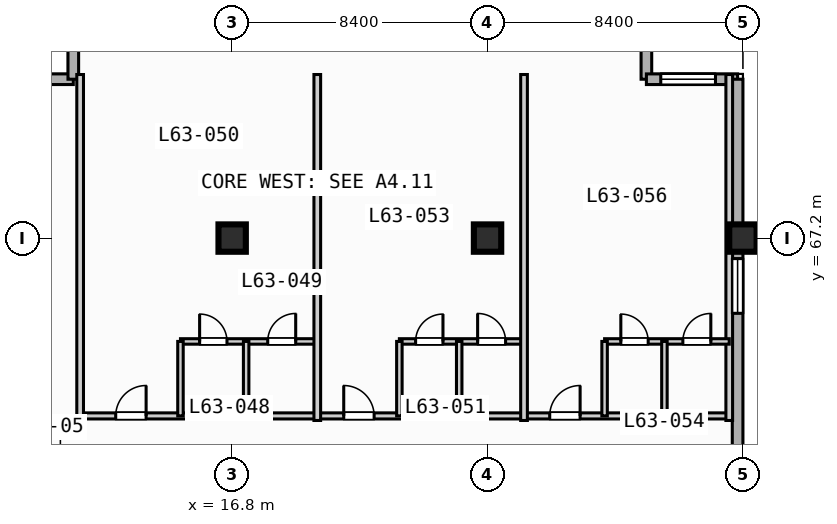
"""IFC4 building model, lengths in metres.
Left out: names, types, materials, properties, quantities, classifications, styles, units other than length and angle.
Written with IfcOpenShell. Run it as: python <this file> out.ifc"""

import sys

from ifc_helpers import new_model, si_unit, direction, frame, frame_2d, origin, origin_2d, place, context, subcontext, project, spatial, rectangle, extrude, element, fill, save


model = new_model("IFC4")
c1 = context("Model", 3, precision=1e-05, world=origin(), true_north=direction((0.0, 1.0)))
c2 = subcontext(c1, "Body", "Model", "MODEL_VIEW")
j1 = project(units=[si_unit("LENGTHUNIT", "METRE"), si_unit("PLANEANGLEUNIT", "RADIAN")], contexts=[c1])
p1 = place(None, origin())
s1 = spatial("IfcSite", under=j1, at=p1, CompositionType="ELEMENT")
p2 = place(p1, origin())
s2 = spatial("IfcBuilding", under=s1, at=p2, CompositionType="ELEMENT")
p3 = place(p2, frame((0.0, 0.0, 256.4)))
s3 = spatial("IfcBuildingStorey", under=s2, at=p3, CompositionType="ELEMENT", Elevation=256.4)
for number, where, z_axis, x_axis in (
    (1, (16.8, 67.2, 0.0), (0.0, 0.0, 1.0), (1.0, 0.0, 0.0)),
    (2, (25.2, 67.2, 0.0), (0.0, 0.0, 1.0), (1.0, 0.0, 0.0)),
    (3, (33.6, 67.2, 0.0), (0.0, 0.0, 1.0), (1.0, 0.0, 0.0)),
):
    element("IfcColumn", number, at=place(p3, frame(where, z_axis=z_axis, x_axis=x_axis)), inside=s3, PredefinedType="COLUMN", context=c2, shape_type="SweptSolid", body=[
        extrude(rectangle(XDim=0.9, YDim=0.9, at=origin_2d()), origin(), (0.0, 0.0, 1.0), 3.7),
    ])
for number, where, z_axis, x_axis in (
    (4, (8.575, 72.425, 0.0), (0.0, 0.0, 1.0), (1.0, 0.0, 0.0)),
    (5, (11.575, 72.425, 0.0), (0.0, 0.0, 1.0), (0.0, 1.0, 0.0)),
    (6, (30.425, 75.425, 0.0), (0.0, 0.0, 1.0), (0.0, -1.0, 0.0)),
):
    element("IfcWall", number, at=place(p3, frame(where, z_axis=z_axis, x_axis=x_axis)), inside=s3, PredefinedType="STANDARD", context=c2, shape_type="SweptSolid", body=[
        extrude(rectangle(XDim=3.0, YDim=0.35, at=frame_2d((1.5, 0.0))), origin(), (0.0, 0.0, 1.0), 3.47),
    ])
p4 = place(p3, frame((30.425, 72.425, 0.0), z_axis=(0.0, 0.0, 1.0), x_axis=(1.0, 0.0, 0.0)))
e7 = element("IfcWall", 7, at=p4, inside=s3, PredefinedType="STANDARD", context=c2, shape_type="SweptSolid", body=[
    extrude(rectangle(XDim=3.0, YDim=0.35, at=frame_2d((1.5, 0.0))), origin(), (0.0, 0.0, 1.0), 3.47),
])
p5 = place(p4, frame((0.472, 0.0, 0.85)))
e8 = element("IfcOpeningElement", 8, at=p5, cuts=e7, PredefinedType="OPENING", context=c2, shape_type="SweptSolid", body=[
    extrude(rectangle(XDim=1.8, YDim=1.8, at=frame_2d((0.9, 0.9))), frame((0.0, 0.185, 0.0), z_axis=(0.0, -1.0, 0.0), x_axis=(1.0, 0.0, 0.0)), (0.0, 0.0, 1.0), 0.37),
])
p6 = place(p3, frame((33.425, 72.425, 0.0), z_axis=(0.0, 0.0, 1.0), x_axis=(0.0, -1.0, 0.0)))
e9 = element("IfcWall", 9, at=p6, inside=s3, PredefinedType="STANDARD", context=c2, shape_type="SweptSolid", body=[
    extrude(rectangle(XDim=39.0, YDim=0.35, at=frame_2d((19.5, 0.0))), origin(), (0.0, 0.0, 1.0), 3.47),
])
p7 = place(p6, frame((5.9, 0.0, 0.85)))
e10 = element("IfcOpeningElement", 10, at=p7, cuts=e9, PredefinedType="OPENING", context=c2, shape_type="SweptSolid", body=[
    extrude(rectangle(XDim=1.8, YDim=1.8, at=frame_2d((0.9, 0.9))), frame((0.0, 0.185, 0.0), z_axis=(0.0, -1.0, 0.0), x_axis=(1.0, 0.0, 0.0)), (0.0, 0.0, 1.0), 0.37),
])
p8 = place(p3, frame((11.8, 61.35, 0.0), z_axis=(0.0, 0.0, 1.0), x_axis=(1.0, 0.0, 0.0)))
e11 = element("IfcWall", 11, at=p8, inside=s3, PredefinedType="PARTITIONING", context=c2, shape_type="SweptSolid", body=[
    extrude(rectangle(XDim=21.35, YDim=0.2, at=frame_2d((10.675, 0.0))), origin(), (0.0, 0.0, 1.0), 3.47),
])
p9 = place(p8, frame((1.17, 0.0, 0.0)))
e12 = element("IfcOpeningElement", 12, at=p9, cuts=e11, PredefinedType="OPENING", context=c2, shape_type="SweptSolid", body=[
    extrude(rectangle(XDim=1.0, YDim=2.15, at=frame_2d((0.5, 1.075))), frame((0.0, 0.11, 0.0), z_axis=(0.0, -1.0, 0.0), x_axis=(1.0, 0.0, 0.0)), (0.0, 0.0, 1.0), 0.22),
])
p10 = place(p8, frame((8.67, 0.0, 0.0)))
e13 = element("IfcOpeningElement", 13, at=p10, cuts=e11, PredefinedType="OPENING", context=c2, shape_type="SweptSolid", body=[
    extrude(rectangle(XDim=1.0, YDim=2.15, at=frame_2d((0.5, 1.075))), frame((0.0, 0.11, 0.0), z_axis=(0.0, -1.0, 0.0), x_axis=(1.0, 0.0, 0.0)), (0.0, 0.0, 1.0), 0.22),
])
p11 = place(p8, frame((15.445, 0.0, 0.0)))
e14 = element("IfcOpeningElement", 14, at=p11, cuts=e11, PredefinedType="OPENING", context=c2, shape_type="SweptSolid", body=[
    extrude(rectangle(XDim=1.0, YDim=2.15, at=frame_2d((0.5, 1.075))), frame((0.0, 0.11, 0.0), z_axis=(0.0, -1.0, 0.0), x_axis=(1.0, 0.0, 0.0)), (0.0, 0.0, 1.0), 0.22),
])
p12 = place(p3, frame((11.8, 61.2, 0.0), z_axis=(0.0, 0.0, 1.0), x_axis=(0.0, 1.0, 0.0)))
e15 = element("IfcWall", 15, at=p12, inside=s3, PredefinedType="PARTITIONING", context=c2, shape_type="SweptSolid", body=[
    extrude(rectangle(XDim=11.38, YDim=0.22, at=frame_2d((5.69, 0.0))), origin(), (0.0, 0.0, 1.0), 3.47),
])
p13 = place(p3, frame((15.1, 63.8, 0.0), z_axis=(0.0, 0.0, 1.0), x_axis=(1.0, 0.0, 0.0)))
e16 = element("IfcWall", 16, at=p13, inside=s3, PredefinedType="PLUMBINGWALL", context=c2, shape_type="SweptSolid", body=[
    extrude(rectangle(XDim=4.5, YDim=0.18, at=frame_2d((2.25, 0.0))), origin(), (0.0, 0.0, 1.0), 3.47),
])
p14 = place(p13, frame((0.63, 0.0, 0.0)))
e17 = element("IfcOpeningElement", 17, at=p14, cuts=e16, PredefinedType="OPENING", context=c2, shape_type="SweptSolid", body=[
    extrude(rectangle(XDim=0.9, YDim=2.1, at=frame_2d((0.45, 1.05))), frame((0.0, 0.1, 0.0), z_axis=(0.0, -1.0, 0.0), x_axis=(1.0, 0.0, 0.0)), (0.0, 0.0, 1.0), 0.2),
])
p15 = place(p13, frame((2.87, 0.0, 0.0)))
e18 = element("IfcOpeningElement", 18, at=p15, cuts=e16, PredefinedType="OPENING", context=c2, shape_type="SweptSolid", body=[
    extrude(rectangle(XDim=0.92, YDim=2.1, at=frame_2d((0.46, 1.05))), frame((0.0, 0.1, 0.0), z_axis=(0.0, -1.0, 0.0), x_axis=(1.0, 0.0, 0.0)), (0.0, 0.0, 1.0), 0.2),
])
for number, where, z_axis, x_axis in (
    (19, (15.1, 61.35, 0.0), (0.0, 0.0, 1.0), (0.0, 1.0, 0.0)),
    (20, (17.26, 61.35, 0.0), (0.0, 0.0, 1.0), (0.0, 1.0, 0.0)),
):
    element("IfcWall", number, at=place(p3, frame(where, z_axis=z_axis, x_axis=x_axis)), inside=s3, PredefinedType="PLUMBINGWALL", context=c2, shape_type="SweptSolid", body=[
        extrude(rectangle(XDim=2.45, YDim=0.18, at=frame_2d((1.225, 0.0))), origin(), (0.0, 0.0, 1.0), 3.47),
    ])
p16 = place(p3, frame((19.6, 61.2, 0.0), z_axis=(0.0, 0.0, 1.0), x_axis=(0.0, 1.0, 0.0)))
e21 = element("IfcWall", 21, at=p16, inside=s3, PredefinedType="PARTITIONING", context=c2, shape_type="SweptSolid", body=[
    extrude(rectangle(XDim=11.38, YDim=0.22, at=frame_2d((5.69, 0.0))), origin(), (0.0, 0.0, 1.0), 3.47),
])
p17 = place(p3, frame((22.3, 63.8, 0.0), z_axis=(0.0, 0.0, 1.0), x_axis=(1.0, 0.0, 0.0)))
e22 = element("IfcWall", 22, at=p17, inside=s3, PredefinedType="PLUMBINGWALL", context=c2, shape_type="SweptSolid", body=[
    extrude(rectangle(XDim=4.1, YDim=0.18, at=frame_2d((2.05, 0.0))), origin(), (0.0, 0.0, 1.0), 3.47),
])
p18 = place(p17, frame((0.534, 0.0, 0.0)))
e23 = element("IfcOpeningElement", 23, at=p18, cuts=e22, PredefinedType="OPENING", context=c2, shape_type="SweptSolid", body=[
    extrude(rectangle(XDim=0.9, YDim=2.1, at=frame_2d((0.45, 1.05))), frame((0.0, 0.1, 0.0), z_axis=(0.0, -1.0, 0.0), x_axis=(1.0, 0.0, 0.0)), (0.0, 0.0, 1.0), 0.2),
])
p19 = place(p17, frame((2.574, 0.0, 0.0)))
e24 = element("IfcOpeningElement", 24, at=p19, cuts=e22, PredefinedType="OPENING", context=c2, shape_type="SweptSolid", body=[
    extrude(rectangle(XDim=0.92, YDim=2.1, at=frame_2d((0.46, 1.05))), frame((0.0, 0.1, 0.0), z_axis=(0.0, -1.0, 0.0), x_axis=(1.0, 0.0, 0.0)), (0.0, 0.0, 1.0), 0.2),
])
for number, where, z_axis, x_axis in (
    (25, (22.3, 61.35, 0.0), (0.0, 0.0, 1.0), (0.0, 1.0, 0.0)),
    (26, (24.268, 61.35, 0.0), (0.0, 0.0, 1.0), (0.0, 1.0, 0.0)),
):
    element("IfcWall", number, at=place(p3, frame(where, z_axis=z_axis, x_axis=x_axis)), inside=s3, PredefinedType="PLUMBINGWALL", context=c2, shape_type="SweptSolid", body=[
        extrude(rectangle(XDim=2.45, YDim=0.18, at=frame_2d((1.225, 0.0))), origin(), (0.0, 0.0, 1.0), 3.47),
    ])
for number, where, z_axis, x_axis in (
    (27, (26.4, 61.2, 0.0), (0.0, 0.0, 1.0), (0.0, 1.0, 0.0)),
    (28, (33.15, 61.2, 0.0), (0.0, 0.0, 1.0), (0.0, 1.0, 0.0)),
):
    element("IfcWall", number, at=place(p3, frame(where, z_axis=z_axis, x_axis=x_axis)), inside=s3, PredefinedType="PARTITIONING", context=c2, shape_type="SweptSolid", body=[
        extrude(rectangle(XDim=11.38, YDim=0.22, at=frame_2d((5.69, 0.0))), origin(), (0.0, 0.0, 1.0), 3.47),
    ])
p20 = place(p3, frame((29.05, 63.8, 0.0), z_axis=(0.0, 0.0, 1.0), x_axis=(1.0, 0.0, 0.0)))
e29 = element("IfcWall", 29, at=p20, inside=s3, PredefinedType="PLUMBINGWALL", context=c2, shape_type="SweptSolid", body=[
    extrude(rectangle(XDim=4.1, YDim=0.18, at=frame_2d((2.05, 0.0))), origin(), (0.0, 0.0, 1.0), 3.47),
])
p21 = place(p20, frame((0.534, 0.0, 0.0)))
e30 = element("IfcOpeningElement", 30, at=p21, cuts=e29, PredefinedType="OPENING", context=c2, shape_type="SweptSolid", body=[
    extrude(rectangle(XDim=0.9, YDim=2.1, at=frame_2d((0.45, 1.05))), frame((0.0, 0.1, 0.0), z_axis=(0.0, -1.0, 0.0), x_axis=(1.0, 0.0, 0.0)), (0.0, 0.0, 1.0), 0.2),
])
p22 = place(p20, frame((2.574, 0.0, 0.0)))
e31 = element("IfcOpeningElement", 31, at=p22, cuts=e29, PredefinedType="OPENING", context=c2, shape_type="SweptSolid", body=[
    extrude(rectangle(XDim=0.92, YDim=2.1, at=frame_2d((0.46, 1.05))), frame((0.0, 0.1, 0.0), z_axis=(0.0, -1.0, 0.0), x_axis=(1.0, 0.0, 0.0)), (0.0, 0.0, 1.0), 0.2),
])
for number, where, z_axis, x_axis in (
    (32, (29.05, 61.35, 0.0), (0.0, 0.0, 1.0), (0.0, 1.0, 0.0)),
    (33, (31.018, 61.35, 0.0), (0.0, 0.0, 1.0), (0.0, 1.0, 0.0)),
):
    element("IfcWall", number, at=place(p3, frame(where, z_axis=z_axis, x_axis=x_axis)), inside=s3, PredefinedType="PLUMBINGWALL", context=c2, shape_type="SweptSolid", body=[
        extrude(rectangle(XDim=2.45, YDim=0.18, at=frame_2d((1.225, 0.0))), origin(), (0.0, 0.0, 1.0), 3.47),
    ])
p23 = place(p5, origin())
e34 = element("IfcWindow", 34, at=p23, inside=s3, PartitioningType="SINGLE_PANEL", PredefinedType="WINDOW", context=c2, shape_type="SweptSolid", body=[
    extrude(rectangle(XDim=1.8, YDim=1.8, at=frame_2d((0.9, 0.9))), frame((0.0, 0.03, 0.0), z_axis=(0.0, -1.0, 0.0), x_axis=(1.0, 0.0, 0.0)), (0.0, 0.0, 1.0), 0.06),
])
fill(e8, e34)
p24 = place(p7, origin())
e35 = element("IfcWindow", 35, at=p24, inside=s3, PartitioningType="SINGLE_PANEL", PredefinedType="WINDOW", context=c2, shape_type="SweptSolid", body=[
    extrude(rectangle(XDim=1.8, YDim=1.8, at=frame_2d((0.9, 0.9))), frame((0.0, 0.03, 0.0), z_axis=(0.0, -1.0, 0.0), x_axis=(1.0, 0.0, 0.0)), (0.0, 0.0, 1.0), 0.06),
])
fill(e10, e35)
p25 = place(p9, origin())
e36 = element("IfcDoor", 36, at=p25, inside=s3, OperationType="SINGLE_SWING_RIGHT", PredefinedType="DOOR", context=c2, shape_type="SweptSolid", body=[
    extrude(rectangle(XDim=1.0, YDim=2.15, at=frame_2d((0.5, 1.075))), frame((0.0, 0.025, 0.0), z_axis=(0.0, -1.0, 0.0), x_axis=(1.0, 0.0, 0.0)), (0.0, 0.0, 1.0), 0.05),
])
fill(e12, e36)
p26 = place(p10, origin())
e37 = element("IfcDoor", 37, at=p26, inside=s3, OperationType="SINGLE_SWING_LEFT", PredefinedType="DOOR", context=c2, shape_type="SweptSolid", body=[
    extrude(rectangle(XDim=1.0, YDim=2.15, at=frame_2d((0.5, 1.075))), frame((0.0, 0.025, 0.0), z_axis=(0.0, -1.0, 0.0), x_axis=(1.0, 0.0, 0.0)), (0.0, 0.0, 1.0), 0.05),
])
fill(e13, e37)
p27 = place(p11, origin())
e38 = element("IfcDoor", 38, at=p27, inside=s3, OperationType="SINGLE_SWING_RIGHT", PredefinedType="DOOR", context=c2, shape_type="SweptSolid", body=[
    extrude(rectangle(XDim=1.0, YDim=2.15, at=frame_2d((0.5, 1.075))), frame((0.0, 0.025, 0.0), z_axis=(0.0, -1.0, 0.0), x_axis=(1.0, 0.0, 0.0)), (0.0, 0.0, 1.0), 0.05),
])
fill(e14, e38)
p28 = place(p14, origin())
e39 = element("IfcDoor", 39, at=p28, inside=s3, OperationType="SINGLE_SWING_LEFT", PredefinedType="DOOR", context=c2, shape_type="SweptSolid", body=[
    extrude(rectangle(XDim=0.9, YDim=2.1, at=frame_2d((0.45, 1.05))), frame((0.0, 0.025, 0.0), z_axis=(0.0, -1.0, 0.0), x_axis=(1.0, 0.0, 0.0)), (0.0, 0.0, 1.0), 0.05),
])
fill(e17, e39)
p29 = place(p15, origin())
e40 = element("IfcDoor", 40, at=p29, inside=s3, OperationType="SINGLE_SWING_RIGHT", PredefinedType="DOOR", context=c2, shape_type="SweptSolid", body=[
    extrude(rectangle(XDim=0.92, YDim=2.1, at=frame_2d((0.46, 1.05))), frame((0.0, 0.025, 0.0), z_axis=(0.0, -1.0, 0.0), x_axis=(1.0, 0.0, 0.0)), (0.0, 0.0, 1.0), 0.05),
])
fill(e18, e40)
p30 = place(p18, origin())
e41 = element("IfcDoor", 41, at=p30, inside=s3, OperationType="SINGLE_SWING_RIGHT", PredefinedType="DOOR", context=c2, shape_type="SweptSolid", body=[
    extrude(rectangle(XDim=0.9, YDim=2.1, at=frame_2d((0.45, 1.05))), frame((0.0, 0.025, 0.0), z_axis=(0.0, -1.0, 0.0), x_axis=(1.0, 0.0, 0.0)), (0.0, 0.0, 1.0), 0.05),
])
fill(e23, e41)
p31 = place(p19, origin())
e42 = element("IfcDoor", 42, at=p31, inside=s3, OperationType="SINGLE_SWING_LEFT", PredefinedType="DOOR", context=c2, shape_type="SweptSolid", body=[
    extrude(rectangle(XDim=0.92, YDim=2.1, at=frame_2d((0.46, 1.05))), frame((0.0, 0.025, 0.0), z_axis=(0.0, -1.0, 0.0), x_axis=(1.0, 0.0, 0.0)), (0.0, 0.0, 1.0), 0.05),
])
fill(e24, e42)
p32 = place(p21, origin())
e43 = element("IfcDoor", 43, at=p32, inside=s3, OperationType="SINGLE_SWING_LEFT", PredefinedType="DOOR", context=c2, shape_type="SweptSolid", body=[
    extrude(rectangle(XDim=0.9, YDim=2.1, at=frame_2d((0.45, 1.05))), frame((0.0, 0.025, 0.0), z_axis=(0.0, -1.0, 0.0), x_axis=(1.0, 0.0, 0.0)), (0.0, 0.0, 1.0), 0.05),
])
fill(e30, e43)
p33 = place(p22, origin())
e44 = element("IfcDoor", 44, at=p33, inside=s3, OperationType="SINGLE_SWING_RIGHT", PredefinedType="DOOR", context=c2, shape_type="SweptSolid", body=[
    extrude(rectangle(XDim=0.92, YDim=2.1, at=frame_2d((0.46, 1.05))), frame((0.0, 0.025, 0.0), z_axis=(0.0, -1.0, 0.0), x_axis=(1.0, 0.0, 0.0)), (0.0, 0.0, 1.0), 0.05),
])
fill(e31, e44)
save(model, sys.argv[1])
